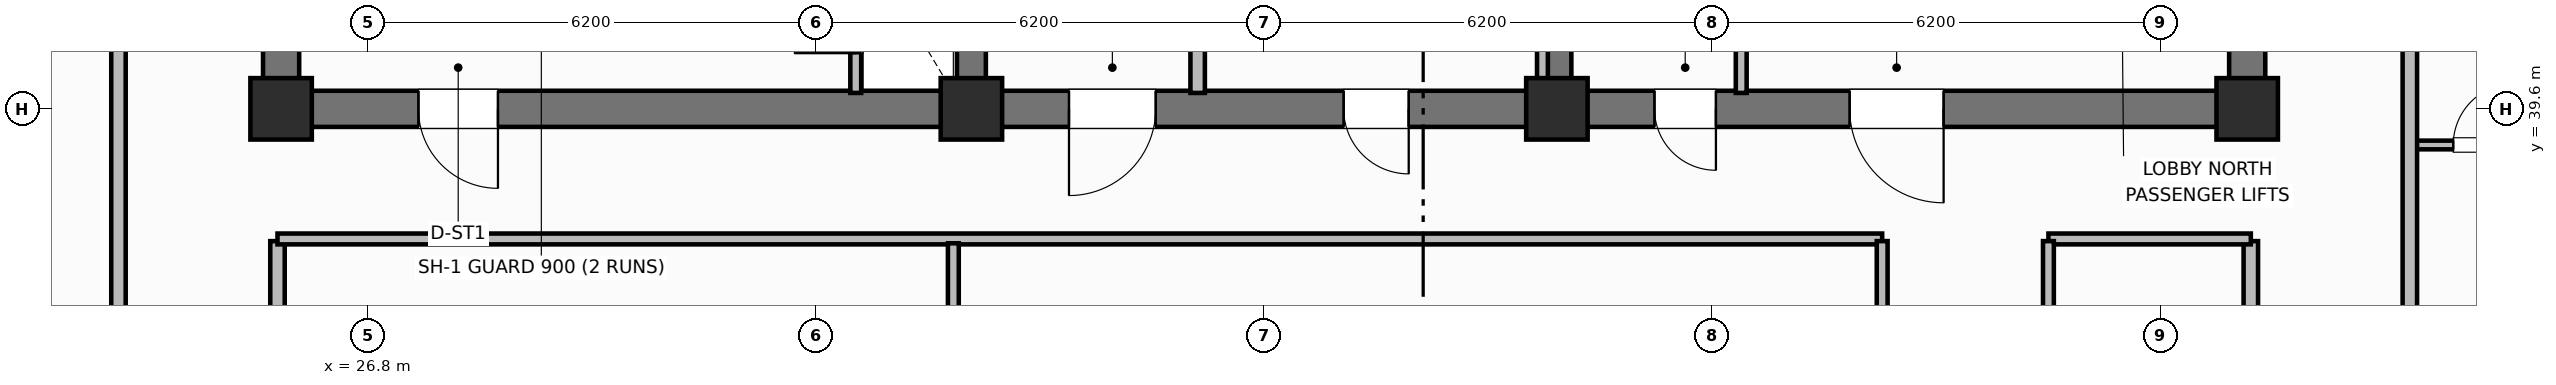
"""IFC4 building model, lengths in metres.
Left out: names, types, materials, properties, quantities, classifications, styles, units other than length and angle.
Written with IfcOpenShell. Run it as: python <this file> out.ifc"""

import sys

from ifc_helpers import new_model, si_unit, direction, frame, frame_2d, origin, origin_2d, place, context, subcontext, project, spatial, rectangle, extrude, element, fill, save


model = new_model("IFC4")
c1 = context("Model", 3, precision=1e-05, world=origin(), true_north=direction((0.0, 1.0)))
c2 = subcontext(c1, "Body", "Model", "MODEL_VIEW")
j1 = project(units=[si_unit("LENGTHUNIT", "METRE"), si_unit("PLANEANGLEUNIT", "RADIAN")], contexts=[c1])
p1 = place(None, origin())
s1 = spatial("IfcSite", under=j1, at=p1, CompositionType="ELEMENT")
p2 = place(p1, origin())
s2 = spatial("IfcBuilding", under=s1, at=p2, CompositionType="ELEMENT")
p3 = place(p2, frame((0.0, 0.0, 207.3)))
s3 = spatial("IfcBuildingStorey", under=s2, at=p3, CompositionType="ELEMENT", Elevation=207.3)
for number, where, z_axis, x_axis in (
    (1, (25.6, 39.85, 0.0), (0.0, 0.0, 1.0), (0.0, 1.0, 0.0)),
    (2, (52.8, 39.85, 0.0), (0.0, 0.0, 1.0), (0.0, 1.0, 0.0)),
):
    element("IfcWall", number, at=place(p3, frame(where, z_axis=z_axis, x_axis=x_axis)), inside=s3, PredefinedType="SHEAR", context=c2, shape_type="SweptSolid", body=[
        extrude(rectangle(XDim=5.7, YDim=0.5, at=frame_2d((2.85, 0.0))), origin(), (0.0, 0.0, 1.0), 3.7),
    ])
p4 = place(p3, frame((52.8, 39.6, 0.0), z_axis=(0.0, 0.0, 1.0), x_axis=(-1.0, 0.0, 0.0)))
e3 = element("IfcWall", 3, at=p4, inside=s3, PredefinedType="SHEAR", context=c2, shape_type="SweptSolid", body=[
    extrude(rectangle(XDim=27.2, YDim=0.5, at=frame_2d((13.6, 0.0))), origin(), (0.0, 0.0, 1.0), 3.7),
])
p5 = place(p4, frame((24.2, 0.0, 0.0)))
e4 = element("IfcOpeningElement", 4, at=p5, cuts=e3, PredefinedType="OPENING", context=c2, shape_type="SweptSolid", body=[
    extrude(rectangle(XDim=1.1, YDim=2.15, at=frame_2d((0.55, 1.075))), frame((0.0, 0.26, 0.0), z_axis=(0.0, -1.0, 0.0), x_axis=(1.0, 0.0, 0.0)), (0.0, 0.0, 1.0), 0.52),
])
p6 = place(p4, frame((15.1, 0.0, 0.0)))
e5 = element("IfcOpeningElement", 5, at=p6, cuts=e3, PredefinedType="OPENING", context=c2, shape_type="SweptSolid", body=[
    extrude(rectangle(XDim=1.2, YDim=2.15, at=frame_2d((0.6, 1.075))), frame((0.0, 0.26, 0.0), z_axis=(0.0, -1.0, 0.0), x_axis=(1.0, 0.0, 0.0)), (0.0, 0.0, 1.0), 0.52),
])
p7 = place(p4, frame((11.6, 0.0, 0.0)))
e6 = element("IfcOpeningElement", 6, at=p7, cuts=e3, PredefinedType="OPENING", context=c2, shape_type="SweptSolid", body=[
    extrude(rectangle(XDim=0.9, YDim=2.1, at=frame_2d((0.45, 1.05))), frame((0.0, 0.26, 0.0), z_axis=(0.0, -1.0, 0.0), x_axis=(1.0, 0.0, 0.0)), (0.0, 0.0, 1.0), 0.52),
])
p8 = place(p4, frame((7.35, 0.0, 0.0)))
e7 = element("IfcOpeningElement", 7, at=p8, cuts=e3, PredefinedType="OPENING", context=c2, shape_type="SweptSolid", body=[
    extrude(rectangle(XDim=0.85, YDim=2.1, at=frame_2d((0.425, 1.05))), frame((0.0, 0.26, 0.0), z_axis=(0.0, -1.0, 0.0), x_axis=(1.0, 0.0, 0.0)), (0.0, 0.0, 1.0), 0.52),
])
p9 = place(p4, frame((4.2, 0.0, 0.0)))
e8 = element("IfcOpeningElement", 8, at=p9, cuts=e3, PredefinedType="OPENING", context=c2, shape_type="SweptSolid", body=[
    extrude(rectangle(XDim=1.3, YDim=2.2, at=frame_2d((0.65, 1.1))), frame((0.0, 0.26, 0.0), z_axis=(0.0, -1.0, 0.0), x_axis=(1.0, 0.0, 0.0)), (0.0, 0.0, 1.0), 0.52),
])
for number, where, z_axis, x_axis in (
    (9, (35.15, 39.85, 0.0), (0.0, 0.0, 1.0), (0.0, 1.0, 0.0)),
    (10, (43.25, 39.85, 0.0), (0.0, 0.0, 1.0), (0.0, 1.0, 0.0)),
):
    element("IfcWall", number, at=place(p3, frame(where, z_axis=z_axis, x_axis=x_axis)), inside=s3, PredefinedType="SHEAR", context=c2, shape_type="SweptSolid", body=[
        extrude(rectangle(XDim=5.7, YDim=0.4, at=frame_2d((2.85, 0.0))), origin(), (0.0, 0.0, 1.0), 3.7),
    ])
for number, where, z_axis, x_axis in (
    (11, (25.6, 39.6, 0.0), (0.0, 0.0, 1.0), (1.0, 0.0, 0.0)),
    (12, (35.15, 39.6, 0.0), (0.0, 0.0, 1.0), (1.0, 0.0, 0.0)),
    (13, (43.25, 39.6, 0.0), (0.0, 0.0, 1.0), (1.0, 0.0, 0.0)),
    (14, (52.8, 39.6, 0.0), (0.0, 0.0, 1.0), (1.0, 0.0, 0.0)),
):
    element("IfcColumn", number, at=place(p3, frame(where, z_axis=z_axis, x_axis=x_axis)), inside=s3, PredefinedType="COLUMN", context=c2, shape_type="SweptSolid", body=[
        extrude(rectangle(XDim=0.85, YDim=0.85, at=origin_2d()), origin(), (0.0, 0.0, 1.0), 3.7),
    ])
p10 = place(p3, frame((33.55, 39.82, 0.0), z_axis=(0.0, 0.0, 1.0), x_axis=(0.0, 1.0, 0.0)))
e15 = element("IfcWall", 15, at=p10, inside=s3, PredefinedType="PARTITIONING", context=c2, shape_type="SweptSolid", body=[
    extrude(rectangle(XDim=2.13, YDim=0.15, at=frame_2d((1.065, 0.0))), origin(), (0.0, 0.0, 1.0), 2.55),
])
p11 = place(p10, frame((0.55, 0.0, 0.0)))
e16 = element("IfcOpeningElement", 16, at=p11, cuts=e15, PredefinedType="OPENING", context=c2, shape_type="SweptSolid", body=[
    extrude(rectangle(XDim=0.85, YDim=2.05, at=frame_2d((0.425, 1.025))), frame((0.0, 0.085, 0.0), z_axis=(0.0, -1.0, 0.0), x_axis=(1.0, 0.0, 0.0)), (0.0, 0.0, 1.0), 0.17),
])
p12 = place(p3, frame((38.28, 39.82, 0.0), z_axis=(0.0, 0.0, 1.0), x_axis=(0.0, 1.0, 0.0)))
e17 = element("IfcWall", 17, at=p12, inside=s3, PredefinedType="PARTITIONING", context=c2, shape_type="SweptSolid", body=[
    extrude(rectangle(XDim=5.63, YDim=0.2, at=frame_2d((2.815, 0.0))), origin(), (0.0, 0.0, 1.0), 2.55),
])
for number, where, z_axis, x_axis in (
    (18, (43.05, 39.82, 0.0), (0.0, 0.0, 1.0), (0.0, 1.0, 0.0)),
    (19, (45.8, 39.82, 0.0), (0.0, 0.0, 1.0), (0.0, 1.0, 0.0)),
):
    element("IfcWall", number, at=place(p3, frame(where, z_axis=z_axis, x_axis=x_axis)), inside=s3, PredefinedType="PARTITIONING", context=c2, shape_type="SweptSolid", body=[
        extrude(rectangle(XDim=5.63, YDim=0.15, at=frame_2d((2.815, 0.0))), origin(), (0.0, 0.0, 1.0), 2.55),
    ])
for number, where, z_axis, x_axis in (
    (20, (25.55, 18.63, 0.0), (0.0, 0.0, 1.0), (0.0, 1.0, 0.0)),
    (21, (52.85, 18.63, 0.0), (0.0, 0.0, 1.0), (0.0, 1.0, 0.0)),
):
    element("IfcWall", number, at=place(p3, frame(where, z_axis=z_axis, x_axis=x_axis)), inside=s3, PredefinedType="PARTITIONING", context=c2, shape_type="SweptSolid", body=[
        extrude(rectangle(XDim=19.14, YDim=0.2, at=frame_2d((9.57, 0.0))), origin(), (0.0, 0.0, 1.0), 2.55),
    ])
p13 = place(p3, frame((25.55, 37.8, 0.0), z_axis=(0.0, 0.0, 1.0), x_axis=(1.0, 0.0, 0.0)))
e22 = element("IfcWall", 22, at=p13, inside=s3, PredefinedType="PARTITIONING", context=c2, shape_type="SweptSolid", body=[
    extrude(rectangle(XDim=22.2, YDim=0.15, at=frame_2d((11.1, 0.0))), origin(), (0.0, 0.0, 1.0), 2.55),
])
p14 = place(p3, frame((50.05, 37.8, 0.0), z_axis=(0.0, 0.0, 1.0), x_axis=(1.0, 0.0, 0.0)))
e23 = element("IfcWall", 23, at=p14, inside=s3, PredefinedType="PARTITIONING", context=c2, shape_type="SweptSolid", body=[
    extrude(rectangle(XDim=2.8, YDim=0.15, at=frame_2d((1.4, 0.0))), origin(), (0.0, 0.0, 1.0), 2.55),
])
p15 = place(p3, frame((34.9, 18.66, 0.0), z_axis=(0.0, 0.0, 1.0), x_axis=(0.0, 1.0, 0.0)))
e24 = element("IfcWall", 24, at=p15, inside=s3, PredefinedType="PARTITIONING", context=c2, shape_type="SweptSolid", body=[
    extrude(rectangle(XDim=19.08, YDim=0.15, at=frame_2d((9.54, 0.0))), origin(), (0.0, 0.0, 1.0), 2.55),
])
p16 = place(p15, frame((5.0, 0.0, 0.0)))
e25 = element("IfcOpeningElement", 25, at=p16, cuts=e24, PredefinedType="OPENING", context=c2, shape_type="SweptSolid", body=[
    extrude(rectangle(XDim=1.0, YDim=2.15, at=frame_2d((0.5, 1.075))), frame((0.0, 0.085, 0.0), z_axis=(0.0, -1.0, 0.0), x_axis=(1.0, 0.0, 0.0)), (0.0, 0.0, 1.0), 0.17),
])
p17 = place(p3, frame((47.75, 18.63, 0.0), z_axis=(0.0, 0.0, 1.0), x_axis=(0.0, 1.0, 0.0)))
e26 = element("IfcWall", 26, at=p17, inside=s3, PredefinedType="PARTITIONING", context=c2, shape_type="SweptSolid", body=[
    extrude(rectangle(XDim=19.14, YDim=0.15, at=frame_2d((9.57, 0.0))), origin(), (0.0, 0.0, 1.0), 2.55),
])
p18 = place(p17, frame((2.4, 0.0, 0.0)))
e27 = element("IfcOpeningElement", 27, at=p18, cuts=e26, PredefinedType="OPENING", context=c2, shape_type="SweptSolid", body=[
    extrude(rectangle(XDim=0.9, YDim=2.1, at=frame_2d((0.45, 1.05))), frame((0.0, 0.085, 0.0), z_axis=(0.0, -1.0, 0.0), x_axis=(1.0, 0.0, 0.0)), (0.0, 0.0, 1.0), 0.17),
])
p19 = place(p17, frame((9.847, 0.0, 0.0)))
e28 = element("IfcOpeningElement", 28, at=p19, cuts=e26, PredefinedType="OPENING", context=c2, shape_type="SweptSolid", body=[
    extrude(rectangle(XDim=0.9, YDim=2.1, at=frame_2d((0.45, 1.05))), frame((0.0, 0.085, 0.0), z_axis=(0.0, -1.0, 0.0), x_axis=(1.0, 0.0, 0.0)), (0.0, 0.0, 1.0), 0.17),
])
p20 = place(p3, frame((50.05, 18.63, 0.0), z_axis=(0.0, 0.0, 1.0), x_axis=(0.0, 1.0, 0.0)))
e29 = element("IfcWall", 29, at=p20, inside=s3, PredefinedType="PARTITIONING", context=c2, shape_type="SweptSolid", body=[
    extrude(rectangle(XDim=19.14, YDim=0.15, at=frame_2d((9.57, 0.0))), origin(), (0.0, 0.0, 1.0), 2.55),
])
p21 = place(p20, frame((2.2, 0.0, 0.0)))
e30 = element("IfcOpeningElement", 30, at=p21, cuts=e29, PredefinedType="OPENING", context=c2, shape_type="SweptSolid", body=[
    extrude(rectangle(XDim=1.0, YDim=2.15, at=frame_2d((0.5, 1.075))), frame((0.0, 0.085, 0.0), z_axis=(0.0, -1.0, 0.0), x_axis=(1.0, 0.0, 0.0)), (0.0, 0.0, 1.0), 0.17),
])
p22 = place(p20, frame((9.847, 0.0, 0.0)))
e31 = element("IfcOpeningElement", 31, at=p22, cuts=e29, PredefinedType="OPENING", context=c2, shape_type="SweptSolid", body=[
    extrude(rectangle(XDim=1.0, YDim=2.15, at=frame_2d((0.5, 1.075))), frame((0.0, 0.085, 0.0), z_axis=(0.0, -1.0, 0.0), x_axis=(1.0, 0.0, 0.0)), (0.0, 0.0, 1.0), 0.17),
])
p23 = place(p3, frame((23.35, 10.6, 0.0), z_axis=(0.0, 0.0, 1.0), x_axis=(0.0, 1.0, 0.0)))
e32 = element("IfcWall", 32, at=p23, inside=s3, PredefinedType="PARTITIONING", context=c2, shape_type="SweptSolid", body=[
    extrude(rectangle(XDim=35.2, YDim=0.2, at=frame_2d((17.6, 0.0))), origin(), (0.0, 0.0, 1.0), 2.55),
])
p24 = place(p23, frame((2.65, 0.0, 0.0)))
e33 = element("IfcOpeningElement", 33, at=p24, cuts=e32, PredefinedType="OPENING", context=c2, shape_type="SweptSolid", body=[
    extrude(rectangle(XDim=1.0, YDim=2.15, at=frame_2d((0.5, 1.075))), frame((0.0, 0.11, 0.0), z_axis=(0.0, -1.0, 0.0), x_axis=(1.0, 0.0, 0.0)), (0.0, 0.0, 1.0), 0.22),
])
p25 = place(p23, frame((19.79, 0.0, 0.0)))
e34 = element("IfcOpeningElement", 34, at=p25, cuts=e32, PredefinedType="OPENING", context=c2, shape_type="SweptSolid", body=[
    extrude(rectangle(XDim=1.0, YDim=2.15, at=frame_2d((0.5, 1.075))), frame((0.0, 0.11, 0.0), z_axis=(0.0, -1.0, 0.0), x_axis=(1.0, 0.0, 0.0)), (0.0, 0.0, 1.0), 0.22),
])
p26 = place(p3, frame((55.05, 39.1, 0.0), z_axis=(0.0, 0.0, 1.0), x_axis=(1.0, 0.0, 0.0)))
e35 = element("IfcWall", 35, at=p26, inside=s3, PredefinedType="PARTITIONING", context=c2, shape_type="SweptSolid", body=[
    extrude(rectangle(XDim=2.25, YDim=0.12, at=frame_2d((1.125, 0.0))), origin(), (0.0, 0.0, 1.0), 2.55),
])
p27 = place(p26, frame((0.6, 0.0, 0.0)))
e36 = element("IfcOpeningElement", 36, at=p27, cuts=e35, PredefinedType="OPENING", context=c2, shape_type="SweptSolid", body=[
    extrude(rectangle(XDim=0.85, YDim=2.1, at=frame_2d((0.425, 1.05))), frame((0.0, 0.07, 0.0), z_axis=(0.0, -1.0, 0.0), x_axis=(1.0, 0.0, 0.0)), (0.0, 0.0, 1.0), 0.14),
])
p28 = place(p3, frame((55.05, 10.6, 0.0), z_axis=(0.0, 0.0, 1.0), x_axis=(0.0, 1.0, 0.0)))
e37 = element("IfcWall", 37, at=p28, inside=s3, PredefinedType="PARTITIONING", context=c2, shape_type="SweptSolid", body=[
    extrude(rectangle(XDim=35.2, YDim=0.2, at=frame_2d((17.6, 0.0))), origin(), (0.0, 0.0, 1.0), 2.55),
])
p29 = place(p28, frame((2.65, 0.0, 0.0)))
e38 = element("IfcOpeningElement", 38, at=p29, cuts=e37, PredefinedType="OPENING", context=c2, shape_type="SweptSolid", body=[
    extrude(rectangle(XDim=1.0, YDim=2.15, at=frame_2d((0.5, 1.075))), frame((0.0, 0.11, 0.0), z_axis=(0.0, -1.0, 0.0), x_axis=(1.0, 0.0, 0.0)), (0.0, 0.0, 1.0), 0.22),
])
p30 = place(p28, frame((12.166, 0.0, 0.0)))
e39 = element("IfcOpeningElement", 39, at=p30, cuts=e37, PredefinedType="OPENING", context=c2, shape_type="SweptSolid", body=[
    extrude(rectangle(XDim=1.0, YDim=2.15, at=frame_2d((0.5, 1.075))), frame((0.0, 0.11, 0.0), z_axis=(0.0, -1.0, 0.0), x_axis=(1.0, 0.0, 0.0)), (0.0, 0.0, 1.0), 0.22),
])
p31 = place(p28, frame((23.65, 0.0, 0.0)))
e40 = element("IfcOpeningElement", 40, at=p31, cuts=e37, PredefinedType="OPENING", context=c2, shape_type="SweptSolid", body=[
    extrude(rectangle(XDim=1.0, YDim=2.15, at=frame_2d((0.5, 1.075))), frame((0.0, 0.11, 0.0), z_axis=(0.0, -1.0, 0.0), x_axis=(1.0, 0.0, 0.0)), (0.0, 0.0, 1.0), 0.22),
])
p32 = place(p11, origin())
e41 = element("IfcDoor", 41, at=p32, inside=s3, OperationType="SINGLE_SWING_LEFT", PredefinedType="TRAPDOOR", context=c2, shape_type="SweptSolid", body=[
    extrude(rectangle(XDim=0.85, YDim=2.05, at=frame_2d((0.425, 1.025))), frame((0.0, 0.025, 0.0), z_axis=(0.0, -1.0, 0.0), x_axis=(1.0, 0.0, 0.0)), (0.0, 0.0, 1.0), 0.05),
])
fill(e16, e41)
p33 = place(p27, origin())
e42 = element("IfcDoor", 42, at=p33, inside=s3, OperationType="SINGLE_SWING_RIGHT", PredefinedType="DOOR", context=c2, shape_type="SweptSolid", body=[
    extrude(rectangle(XDim=0.85, YDim=2.1, at=frame_2d((0.425, 1.05))), frame((0.0, 0.025, 0.0), z_axis=(0.0, -1.0, 0.0), x_axis=(1.0, 0.0, 0.0)), (0.0, 0.0, 1.0), 0.05),
])
fill(e36, e42)
p34 = place(p5, origin())
e43 = element("IfcDoor", 43, at=p34, inside=s3, OperationType="SINGLE_SWING_LEFT", PredefinedType="DOOR", context=c2, shape_type="SweptSolid", body=[
    extrude(rectangle(XDim=1.1, YDim=2.15, at=frame_2d((0.55, 1.075))), frame((0.0, 0.025, 0.0), z_axis=(0.0, -1.0, 0.0), x_axis=(1.0, 0.0, 0.0)), (0.0, 0.0, 1.0), 0.05),
])
fill(e4, e43)
p35 = place(p6, origin())
e44 = element("IfcDoor", 44, at=p35, inside=s3, OperationType="SINGLE_SWING_RIGHT", PredefinedType="DOOR", context=c2, shape_type="SweptSolid", body=[
    extrude(rectangle(XDim=1.2, YDim=2.15, at=frame_2d((0.6, 1.075))), frame((0.0, 0.025, 0.0), z_axis=(0.0, -1.0, 0.0), x_axis=(1.0, 0.0, 0.0)), (0.0, 0.0, 1.0), 0.05),
])
fill(e5, e44)
p36 = place(p7, origin())
e45 = element("IfcDoor", 45, at=p36, inside=s3, OperationType="SINGLE_SWING_LEFT", PredefinedType="DOOR", context=c2, shape_type="SweptSolid", body=[
    extrude(rectangle(XDim=0.9, YDim=2.1, at=frame_2d((0.45, 1.05))), frame((0.0, 0.025, 0.0), z_axis=(0.0, -1.0, 0.0), x_axis=(1.0, 0.0, 0.0)), (0.0, 0.0, 1.0), 0.05),
])
fill(e6, e45)
p37 = place(p8, origin())
e46 = element("IfcDoor", 46, at=p37, inside=s3, OperationType="SINGLE_SWING_LEFT", PredefinedType="DOOR", context=c2, shape_type="SweptSolid", body=[
    extrude(rectangle(XDim=0.85, YDim=2.1, at=frame_2d((0.425, 1.05))), frame((0.0, 0.025, 0.0), z_axis=(0.0, -1.0, 0.0), x_axis=(1.0, 0.0, 0.0)), (0.0, 0.0, 1.0), 0.05),
])
fill(e7, e46)
p38 = place(p9, origin())
e47 = element("IfcDoor", 47, at=p38, inside=s3, OperationType="SINGLE_SWING_LEFT", PredefinedType="DOOR", context=c2, shape_type="SweptSolid", body=[
    extrude(rectangle(XDim=1.3, YDim=2.2, at=frame_2d((0.65, 1.1))), frame((0.0, 0.025, 0.0), z_axis=(0.0, -1.0, 0.0), x_axis=(1.0, 0.0, 0.0)), (0.0, 0.0, 1.0), 0.05),
])
fill(e8, e47)
save(model, sys.argv[1])
